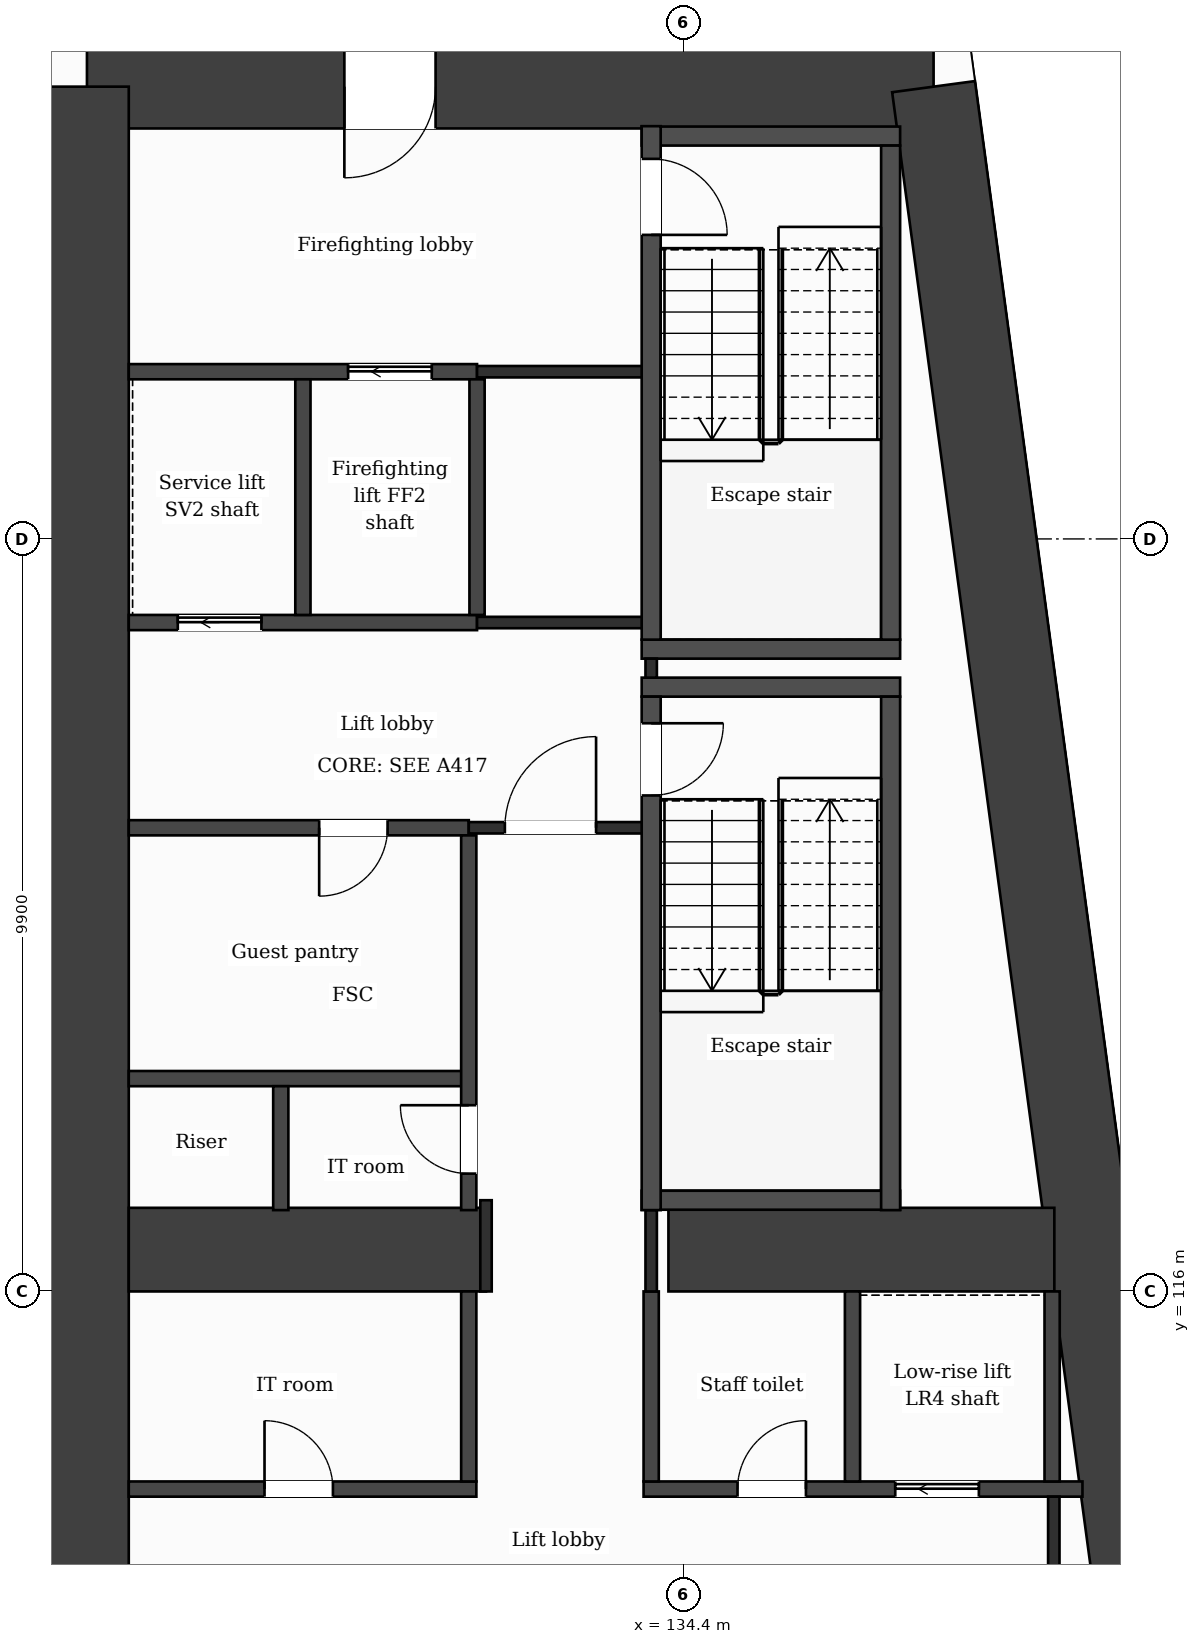
"""IFC4 building model, lengths in metres.
Left out: names, types, materials, properties, quantities, classifications, styles, units other than length and angle.
Written with IfcOpenShell. Run it as: python <this file> out.ifc"""

import sys

from ifc_helpers import new_model, si_unit, direction, frame, frame_2d, origin, place, context, subcontext, project, spatial, rectangle, extrude, element, fill, save


model = new_model("IFC4")
c1 = context("Model", 3, precision=1e-05, world=origin(), true_north=direction((0.0, 1.0)))
c2 = subcontext(c1, "Body", "Model", "MODEL_VIEW")
j1 = project(units=[si_unit("LENGTHUNIT", "METRE"), si_unit("PLANEANGLEUNIT", "RADIAN")], contexts=[c1])
p1 = place(None, origin())
s1 = spatial("IfcSite", under=j1, at=p1, CompositionType="ELEMENT")
p2 = place(p1, origin())
s2 = spatial("IfcBuilding", under=s1, at=p2, CompositionType="ELEMENT")
p3 = place(p2, frame((0.0, 0.0, 74.0)))
s3 = spatial("IfcBuildingStorey", under=s2, at=p3, CompositionType="ELEMENT", Elevation=74.0)
p4 = place(p3, frame((126.55, 131.85, 0.0), z_axis=(0.0, 0.0, 1.0), x_axis=(1.0, 0.0, 0.0)))
e1 = element("IfcWall", 1, at=p4, inside=s3, PredefinedType="SHEAR", context=c2, shape_type="SweptSolid", body=[
    extrude(rectangle(XDim=11.138, YDim=1.1, at=frame_2d((5.569, 0.0))), origin(), (0.0, 0.0, 1.0), 3.5),
])
p5 = place(p4, frame((3.386, 0.0, 0.0)))
e2 = element("IfcOpeningElement", 2, at=p5, cuts=e1, PredefinedType="OPENING", context=c2, shape_type="SweptSolid", body=[
    extrude(rectangle(XDim=1.2, YDim=2.1, at=frame_2d((0.6, 1.05))), frame((0.0, 0.56, 0.0), z_axis=(0.0, -1.0, 0.0), x_axis=(1.0, 0.0, 0.0)), (0.0, 0.0, 1.0), 1.12),
])
p6 = place(p3, frame((137.688, 131.85, 0.0), z_axis=(0.0, 0.0, 1.0), x_axis=(0.133411793472, -0.991060691059, 0.0)))
e3 = element("IfcWall", 3, at=p6, inside=s3, PredefinedType="SHEAR", context=c2, shape_type="SweptSolid", body=[
    extrude(rectangle(XDim=21.089, YDim=1.1, at=frame_2d((10.544, 0.0))), origin(), (0.0, 0.0, 1.0), 3.5),
])
p7 = place(p3, frame((126.55, 110.95, 0.0), z_axis=(0.0, 0.0, 1.0), x_axis=(0.0, 1.0, 0.0)))
e4 = element("IfcWall", 4, at=p7, inside=s3, PredefinedType="SHEAR", context=c2, shape_type="SweptSolid", body=[
    extrude(rectangle(XDim=20.9, YDim=1.1, at=frame_2d((10.45, 0.0))), origin(), (0.0, 0.0, 1.0), 3.5),
])
p8 = place(p3, frame((127.1, 116.55, 0.0), z_axis=(0.0, 0.0, 1.0), x_axis=(1.0, 0.0, 0.0)))
e5 = element("IfcWall", 5, at=p8, inside=s3, PredefinedType="SHEAR", context=c2, shape_type="SweptSolid", body=[
    extrude(rectangle(XDim=4.7, YDim=1.1, at=frame_2d((2.35, 0.0))), origin(), (0.0, 0.0, 1.0), 3.5),
])
p9 = place(p3, frame((134.2, 116.55, 0.0), z_axis=(0.0, 0.0, 1.0), x_axis=(1.0, 0.0, 0.0)))
e6 = element("IfcWall", 6, at=p9, inside=s3, PredefinedType="SHEAR", context=c2, shape_type="SweptSolid", body=[
    extrude(rectangle(XDim=5.077, YDim=1.1, at=frame_2d((2.539, 0.0))), origin(), (0.0, 0.0, 1.0), 3.5),
])
p10 = place(p3, frame((127.1, 113.4, 0.0), z_axis=(0.0, 0.0, 1.0), x_axis=(1.0, 0.0, 0.0)))
e7 = element("IfcWall", 7, at=p10, inside=s3, PredefinedType="PARTITIONING", context=c2, shape_type="SweptSolid", body=[
    extrude(rectangle(XDim=4.573, YDim=0.2, at=frame_2d((2.287, 0.0))), origin(), (0.0, 0.0, 1.0), 3.18),
])
p11 = place(p10, frame((1.786, 0.0, 0.0)))
e8 = element("IfcOpeningElement", 8, at=p11, cuts=e7, PredefinedType="OPENING", context=c2, shape_type="SweptSolid", body=[
    extrude(rectangle(XDim=0.9, YDim=2.1, at=frame_2d((0.45, 1.05))), frame((0.0, 0.11, 0.0), z_axis=(0.0, -1.0, 0.0), x_axis=(1.0, 0.0, 0.0)), (0.0, 0.0, 1.0), 0.22),
])
p12 = place(p3, frame((133.873, 113.4, 0.0), z_axis=(0.0, 0.0, 1.0), x_axis=(1.0, 0.0, 0.0)))
e9 = element("IfcWall", 9, at=p12, inside=s3, PredefinedType="PARTITIONING", context=c2, shape_type="SweptSolid", body=[
    extrude(rectangle(XDim=5.774, YDim=0.2, at=frame_2d((2.887, 0.0))), origin(), (0.0, 0.0, 1.0), 3.18),
])
p13 = place(p12, frame((3.311, 0.0, 0.0)))
e10 = element("IfcOpeningElement", 10, at=p13, cuts=e9, PredefinedType="OPENING", context=c2, shape_type="SweptSolid", body=[
    extrude(rectangle(XDim=1.1, YDim=2.1, at=frame_2d((0.55, 1.05))), frame((0.0, 0.11, 0.0), z_axis=(0.0, -1.0, 0.0), x_axis=(1.0, 0.0, 0.0)), (0.0, 0.0, 1.0), 0.22),
])
p14 = place(p12, frame((1.236, 0.0, 0.0)))
e11 = element("IfcOpeningElement", 11, at=p14, cuts=e9, PredefinedType="OPENING", context=c2, shape_type="SweptSolid", body=[
    extrude(rectangle(XDim=0.9, YDim=2.1, at=frame_2d((0.45, 1.05))), frame((0.0, 0.11, 0.0), z_axis=(0.0, -1.0, 0.0), x_axis=(1.0, 0.0, 0.0)), (0.0, 0.0, 1.0), 0.22),
])
p15 = place(p3, frame((133.848, 117.2, 0.0), z_axis=(0.0, 0.0, 1.0), x_axis=(1.0, 0.0, 0.0)))
e12 = element("IfcWall", 12, at=p15, inside=s3, PredefinedType="PARTITIONING", context=c2, shape_type="SweptSolid", body=[
    extrude(rectangle(XDim=3.4, YDim=0.25, at=frame_2d((1.7, 0.0))), origin(), (0.0, 0.0, 1.0), 3.18),
])
p16 = place(p3, frame((127.1, 118.8, 0.0), z_axis=(0.0, 0.0, 1.0), x_axis=(1.0, 0.0, 0.0)))
e13 = element("IfcWall", 13, at=p16, inside=s3, PredefinedType="PARTITIONING", context=c2, shape_type="SweptSolid", body=[
    extrude(rectangle(XDim=4.473, YDim=0.2, at=frame_2d((2.236, 0.0))), origin(), (0.0, 0.0, 1.0), 3.18),
])
p17 = place(p3, frame((127.1, 122.1, 0.0), z_axis=(0.0, 0.0, 1.0), x_axis=(1.0, 0.0, 0.0)))
e14 = element("IfcWall", 14, at=p17, inside=s3, PredefinedType="PARTITIONING", context=c2, shape_type="SweptSolid", body=[
    extrude(rectangle(XDim=4.473, YDim=0.2, at=frame_2d((2.236, 0.0))), origin(), (0.0, 0.0, 1.0), 3.18),
])
p18 = place(p17, frame((2.505, 0.0, 0.0)))
e15 = element("IfcOpeningElement", 15, at=p18, cuts=e14, PredefinedType="OPENING", context=c2, shape_type="SweptSolid", body=[
    extrude(rectangle(XDim=0.9, YDim=2.1, at=frame_2d((0.45, 1.05))), frame((0.0, 0.11, 0.0), z_axis=(0.0, -1.0, 0.0), x_axis=(1.0, 0.0, 0.0)), (0.0, 0.0, 1.0), 0.22),
])
p19 = place(p3, frame((131.573, 122.1, 0.0), z_axis=(0.0, 0.0, 1.0), x_axis=(1.0, 0.0, 0.0)))
e16 = element("IfcWall", 16, at=p19, inside=s3, PredefinedType="PARTITIONING", context=c2, shape_type="SweptSolid", body=[
    extrude(rectangle(XDim=2.4, YDim=0.15, at=frame_2d((1.2, 0.0))), origin(), (0.0, 0.0, 1.0), 3.18),
])
p20 = place(p19, frame((0.475, 0.0, 0.0)))
e17 = element("IfcOpeningElement", 17, at=p20, cuts=e16, PredefinedType="OPENING", context=c2, shape_type="SweptSolid", body=[
    extrude(rectangle(XDim=1.2, YDim=2.1, at=frame_2d((0.6, 1.05))), frame((0.0, 0.085, 0.0), z_axis=(0.0, -1.0, 0.0), x_axis=(1.0, 0.0, 0.0)), (0.0, 0.0, 1.0), 0.17),
])
for number, where, z_axis, x_axis in (
    (18, (133.848, 123.95, 0.0), (0.0, 0.0, 1.0), (1.0, 0.0, 0.0)),
    (19, (133.848, 124.45, 0.0), (0.0, 0.0, 1.0), (1.0, 0.0, 0.0)),
):
    element("IfcWall", number, at=place(p3, frame(where, z_axis=z_axis, x_axis=x_axis)), inside=s3, PredefinedType="PARTITIONING", context=c2, shape_type="SweptSolid", body=[
        extrude(rectangle(XDim=3.4, YDim=0.25, at=frame_2d((1.7, 0.0))), origin(), (0.0, 0.0, 1.0), 3.18),
    ])
p21 = place(p3, frame((127.1, 124.8, 0.0), z_axis=(0.0, 0.0, 1.0), x_axis=(1.0, 0.0, 0.0)))
e20 = element("IfcWall", 20, at=p21, inside=s3, PredefinedType="PARTITIONING", context=c2, shape_type="SweptSolid", body=[
    extrude(rectangle(XDim=4.582, YDim=0.2, at=frame_2d((2.291, 0.0))), origin(), (0.0, 0.0, 1.0), 3.18),
])
p22 = place(p21, frame((0.645, 0.0, 0.0)))
e21 = element("IfcOpeningElement", 21, at=p22, cuts=e20, PredefinedType="OPENING", context=c2, shape_type="SweptSolid", body=[
    extrude(rectangle(XDim=1.1, YDim=2.1, at=frame_2d((0.55, 1.05))), frame((0.0, 0.11, 0.0), z_axis=(0.0, -1.0, 0.0), x_axis=(1.0, 0.0, 0.0)), (0.0, 0.0, 1.0), 0.22),
])
p23 = place(p3, frame((131.682, 124.8, 0.0), z_axis=(0.0, 0.0, 1.0), x_axis=(1.0, 0.0, 0.0)))
e22 = element("IfcWall", 22, at=p23, inside=s3, PredefinedType="PARTITIONING", context=c2, shape_type="SweptSolid", body=[
    extrude(rectangle(XDim=2.416, YDim=0.15, at=frame_2d((1.208, 0.0))), origin(), (0.0, 0.0, 1.0), 3.18),
])
p24 = place(p3, frame((127.1, 128.1, 0.0), z_axis=(0.0, 0.0, 1.0), x_axis=(1.0, 0.0, 0.0)))
e23 = element("IfcWall", 23, at=p24, inside=s3, PredefinedType="PARTITIONING", context=c2, shape_type="SweptSolid", body=[
    extrude(rectangle(XDim=4.582, YDim=0.2, at=frame_2d((2.291, 0.0))), origin(), (0.0, 0.0, 1.0), 3.18),
])
p25 = place(p24, frame((2.886, 0.0, 0.0)))
e24 = element("IfcOpeningElement", 24, at=p25, cuts=e23, PredefinedType="OPENING", context=c2, shape_type="SweptSolid", body=[
    extrude(rectangle(XDim=1.1, YDim=2.1, at=frame_2d((0.55, 1.05))), frame((0.0, 0.11, 0.0), z_axis=(0.0, -1.0, 0.0), x_axis=(1.0, 0.0, 0.0)), (0.0, 0.0, 1.0), 0.22),
])
p26 = place(p3, frame((131.682, 128.1, 0.0), z_axis=(0.0, 0.0, 1.0), x_axis=(1.0, 0.0, 0.0)))
e25 = element("IfcWall", 25, at=p26, inside=s3, PredefinedType="PARTITIONING", context=c2, shape_type="SweptSolid", body=[
    extrude(rectangle(XDim=2.291, YDim=0.15, at=frame_2d((1.146, 0.0))), origin(), (0.0, 0.0, 1.0), 3.18),
])
p27 = place(p3, frame((133.848, 131.2, 0.0), z_axis=(0.0, 0.0, 1.0), x_axis=(1.0, 0.0, 0.0)))
e26 = element("IfcWall", 26, at=p27, inside=s3, PredefinedType="PARTITIONING", context=c2, shape_type="SweptSolid", body=[
    extrude(rectangle(XDim=3.4, YDim=0.25, at=frame_2d((1.7, 0.0))), origin(), (0.0, 0.0, 1.0), 3.18),
])
p28 = place(p3, frame((129.1, 117.07, 0.0), z_axis=(0.0, 0.0, 1.0), x_axis=(0.0, 1.0, 0.0)))
e27 = element("IfcWall", 27, at=p28, inside=s3, PredefinedType="PARTITIONING", context=c2, shape_type="SweptSolid", body=[
    extrude(rectangle(XDim=1.63, YDim=0.2, at=frame_2d((0.815, 0.0))), origin(), (0.0, 0.0, 1.0), 3.18),
])
p29 = place(p3, frame((129.391, 124.9, 0.0), z_axis=(0.0, 0.0, 1.0), x_axis=(0.0, 1.0, 0.0)))
e28 = element("IfcWall", 28, at=p29, inside=s3, PredefinedType="PARTITIONING", context=c2, shape_type="SweptSolid", body=[
    extrude(rectangle(XDim=3.1, YDim=0.2, at=frame_2d((1.55, 0.0))), origin(), (0.0, 0.0, 1.0), 3.18),
])
p30 = place(p3, frame((131.573, 113.5, 0.0), z_axis=(0.0, 0.0, 1.0), x_axis=(0.0, 1.0, 0.0)))
e29 = element("IfcWall", 29, at=p30, inside=s3, PredefinedType="PARTITIONING", context=c2, shape_type="SweptSolid", body=[
    extrude(rectangle(XDim=2.5, YDim=0.2, at=frame_2d((1.25, 0.0))), origin(), (0.0, 0.0, 1.0), 3.18),
])
p31 = place(p3, frame((131.573, 117.07, 0.0), z_axis=(0.0, 0.0, 1.0), x_axis=(0.0, 1.0, 0.0)))
e30 = element("IfcWall", 30, at=p31, inside=s3, PredefinedType="PARTITIONING", context=c2, shape_type="SweptSolid", body=[
    extrude(rectangle(XDim=4.93, YDim=0.2, at=frame_2d((2.465, 0.0))), origin(), (0.0, 0.0, 1.0), 3.18),
])
p32 = place(p31, frame((0.48, 0.0, 0.0)))
e31 = element("IfcOpeningElement", 31, at=p32, cuts=e30, PredefinedType="OPENING", context=c2, shape_type="SweptSolid", body=[
    extrude(rectangle(XDim=0.9, YDim=2.1, at=frame_2d((0.45, 1.05))), frame((0.0, 0.11, 0.0), z_axis=(0.0, -1.0, 0.0), x_axis=(1.0, 0.0, 0.0)), (0.0, 0.0, 1.0), 0.22),
])
p33 = place(p3, frame((131.682, 124.9, 0.0), z_axis=(0.0, 0.0, 1.0), x_axis=(0.0, 1.0, 0.0)))
e32 = element("IfcWall", 32, at=p33, inside=s3, PredefinedType="PARTITIONING", context=c2, shape_type="SweptSolid", body=[
    extrude(rectangle(XDim=3.1, YDim=0.2, at=frame_2d((1.55, 0.0))), origin(), (0.0, 0.0, 1.0), 3.18),
])
p34 = place(p3, frame((131.8, 116.0, 0.0), z_axis=(0.0, 0.0, 1.0), x_axis=(0.0, 1.0, 0.0)))
e33 = element("IfcWall", 33, at=p34, inside=s3, PredefinedType="PARTITIONING", context=c2, shape_type="SweptSolid", body=[
    extrude(rectangle(XDim=1.2, YDim=0.15, at=frame_2d((0.6, 0.0))), origin(), (0.0, 0.0, 1.0), 3.18),
])
p35 = place(p3, frame((133.973, 113.5, 0.0), z_axis=(0.0, 0.0, 1.0), x_axis=(0.0, 1.0, 0.0)))
e34 = element("IfcWall", 34, at=p35, inside=s3, PredefinedType="PARTITIONING", context=c2, shape_type="SweptSolid", body=[
    extrude(rectangle(XDim=2.5, YDim=0.2, at=frame_2d((1.25, 0.0))), origin(), (0.0, 0.0, 1.0), 3.18),
])
p36 = place(p3, frame((133.973, 116.0, 0.0), z_axis=(0.0, 0.0, 1.0), x_axis=(0.0, 1.0, 0.0)))
e35 = element("IfcWall", 35, at=p36, inside=s3, PredefinedType="PARTITIONING", context=c2, shape_type="SweptSolid", body=[
    extrude(rectangle(XDim=1.07, YDim=0.15, at=frame_2d((0.535, 0.0))), origin(), (0.0, 0.0, 1.0), 3.18),
])
p37 = place(p3, frame((133.973, 124.075, 0.0), z_axis=(0.0, 0.0, 1.0), x_axis=(0.0, 1.0, 0.0)))
e36 = element("IfcWall", 36, at=p37, inside=s3, PredefinedType="PARTITIONING", context=c2, shape_type="SweptSolid", body=[
    extrude(rectangle(XDim=0.25, YDim=0.15, at=frame_2d((0.125, 0.0))), origin(), (0.0, 0.0, 1.0), 3.18),
])
p38 = place(p3, frame((133.973, 117.07, 0.0), z_axis=(0.0, 0.0, 1.0), x_axis=(0.0, 1.0, 0.0)))
e37 = element("IfcWall", 37, at=p38, inside=s3, PredefinedType="PARTITIONING", context=c2, shape_type="SweptSolid", body=[
    extrude(rectangle(XDim=6.755, YDim=0.25, at=frame_2d((3.377, 0.0))), origin(), (0.0, 0.0, 1.0), 3.18),
])
p39 = place(p38, frame((5.455, 0.0, 0.0)))
e38 = element("IfcOpeningElement", 38, at=p39, cuts=e37, PredefinedType="OPENING", context=c2, shape_type="SweptSolid", body=[
    extrude(rectangle(XDim=0.95, YDim=2.1, at=frame_2d((0.475, 1.05))), frame((0.0, 0.135, 0.0), z_axis=(0.0, -1.0, 0.0), x_axis=(1.0, 0.0, 0.0)), (0.0, 0.0, 1.0), 0.27),
])
p40 = place(p3, frame((133.973, 124.575, 0.0), z_axis=(0.0, 0.0, 1.0), x_axis=(0.0, 1.0, 0.0)))
e39 = element("IfcWall", 39, at=p40, inside=s3, PredefinedType="PARTITIONING", context=c2, shape_type="SweptSolid", body=[
    extrude(rectangle(XDim=6.755, YDim=0.25, at=frame_2d((3.377, 0.0))), origin(), (0.0, 0.0, 1.0), 3.18),
])
p41 = place(p40, frame((5.325, 0.0, 0.0)))
e40 = element("IfcOpeningElement", 40, at=p41, cuts=e39, PredefinedType="OPENING", context=c2, shape_type="SweptSolid", body=[
    extrude(rectangle(XDim=1.0, YDim=2.1, at=frame_2d((0.5, 1.05))), frame((0.0, 0.135, 0.0), z_axis=(0.0, -1.0, 0.0), x_axis=(1.0, 0.0, 0.0)), (0.0, 0.0, 1.0), 0.27),
])
p42 = place(p3, frame((136.622, 113.5, 0.0), z_axis=(0.0, 0.0, 1.0), x_axis=(0.0, 1.0, 0.0)))
e41 = element("IfcWall", 41, at=p42, inside=s3, PredefinedType="PARTITIONING", context=c2, shape_type="SweptSolid", body=[
    extrude(rectangle(XDim=2.5, YDim=0.2, at=frame_2d((1.25, 0.0))), origin(), (0.0, 0.0, 1.0), 3.18),
])
p43 = place(p3, frame((137.123, 117.07, 0.0), z_axis=(0.0, 0.0, 1.0), x_axis=(0.0, 1.0, 0.0)))
e42 = element("IfcWall", 42, at=p43, inside=s3, PredefinedType="PARTITIONING", context=c2, shape_type="SweptSolid", body=[
    extrude(rectangle(XDim=6.755, YDim=0.25, at=frame_2d((3.377, 0.0))), origin(), (0.0, 0.0, 1.0), 3.18),
])
p44 = place(p3, frame((137.123, 124.575, 0.0), z_axis=(0.0, 0.0, 1.0), x_axis=(0.0, 1.0, 0.0)))
e43 = element("IfcWall", 43, at=p44, inside=s3, PredefinedType="PARTITIONING", context=c2, shape_type="SweptSolid", body=[
    extrude(rectangle(XDim=6.5, YDim=0.25, at=frame_2d((3.25, 0.0))), origin(), (0.0, 0.0, 1.0), 3.18),
])
p45 = place(p3, frame((139.248, 113.5, 0.0), z_axis=(0.0, 0.0, 1.0), x_axis=(0.0, 1.0, 0.0)))
e44 = element("IfcWall", 44, at=p45, inside=s3, PredefinedType="PARTITIONING", context=c2, shape_type="SweptSolid", body=[
    extrude(rectangle(XDim=2.5, YDim=0.2, at=frame_2d((1.25, 0.0))), origin(), (0.0, 0.0, 1.0), 3.18),
])
p46 = place(p3, frame((139.27, 111.5, 0.0), z_axis=(0.0, 0.0, 1.0), x_axis=(0.0, 1.0, 0.0)))
e45 = element("IfcWall", 45, at=p46, inside=s3, PredefinedType="PARTITIONING", context=c2, shape_type="SweptSolid", body=[
    extrude(rectangle(XDim=1.8, YDim=0.15, at=frame_2d((0.9, 0.0))), origin(), (0.0, 0.0, 1.0), 3.18),
])
p47 = place(p20, origin())
e46 = element("IfcDoor", 46, at=p47, inside=s3, OperationType="SINGLE_SWING_RIGHT", PredefinedType="DOOR", context=c2, shape_type="SweptSolid", body=[
    extrude(rectangle(XDim=1.2, YDim=2.1, at=frame_2d((0.6, 1.05))), frame((0.0, 0.025, 0.0), z_axis=(0.0, -1.0, 0.0), x_axis=(1.0, 0.0, 0.0)), (0.0, 0.0, 1.0), 0.05),
])
fill(e17, e46)
p48 = place(p25, origin())
e47 = element("IfcDoor", 47, at=p48, inside=s3, OperationType="SLIDING_TO_LEFT", PredefinedType="DOOR", context=c2, shape_type="SweptSolid", body=[
    extrude(rectangle(XDim=1.1, YDim=2.1, at=frame_2d((0.55, 1.05))), frame((0.0, 0.025, 0.0), z_axis=(0.0, -1.0, 0.0), x_axis=(1.0, 0.0, 0.0)), (0.0, 0.0, 1.0), 0.05),
])
fill(e24, e47)
p49 = place(p22, origin())
e48 = element("IfcDoor", 48, at=p49, inside=s3, OperationType="SLIDING_TO_LEFT", PredefinedType="DOOR", context=c2, shape_type="SweptSolid", body=[
    extrude(rectangle(XDim=1.1, YDim=2.1, at=frame_2d((0.55, 1.05))), frame((0.0, 0.025, 0.0), z_axis=(0.0, -1.0, 0.0), x_axis=(1.0, 0.0, 0.0)), (0.0, 0.0, 1.0), 0.05),
])
fill(e21, e48)
p50 = place(p18, origin())
e49 = element("IfcDoor", 49, at=p50, inside=s3, OperationType="SINGLE_SWING_LEFT", PredefinedType="DOOR", context=c2, shape_type="SweptSolid", body=[
    extrude(rectangle(XDim=0.9, YDim=2.1, at=frame_2d((0.45, 1.05))), frame((0.0, 0.025, 0.0), z_axis=(0.0, -1.0, 0.0), x_axis=(1.0, 0.0, 0.0)), (0.0, 0.0, 1.0), 0.05),
])
fill(e15, e49)
p51 = place(p39, origin())
e50 = element("IfcDoor", 50, at=p51, inside=s3, OperationType="SINGLE_SWING_RIGHT", PredefinedType="DOOR", context=c2, shape_type="SweptSolid", body=[
    extrude(rectangle(XDim=0.95, YDim=2.1, at=frame_2d((0.475, 1.05))), frame((0.0, 0.025, 0.0), z_axis=(0.0, -1.0, 0.0), x_axis=(1.0, 0.0, 0.0)), (0.0, 0.0, 1.0), 0.05),
])
fill(e38, e50)
p52 = place(p41, origin())
e51 = element("IfcDoor", 51, at=p52, inside=s3, OperationType="SINGLE_SWING_LEFT", PredefinedType="DOOR", context=c2, shape_type="SweptSolid", body=[
    extrude(rectangle(XDim=1.0, YDim=2.1, at=frame_2d((0.5, 1.05))), frame((0.0, 0.025, 0.0), z_axis=(0.0, -1.0, 0.0), x_axis=(1.0, 0.0, 0.0)), (0.0, 0.0, 1.0), 0.05),
])
fill(e40, e51)
p53 = place(p32, origin())
e52 = element("IfcDoor", 52, at=p53, inside=s3, OperationType="SINGLE_SWING_RIGHT", PredefinedType="DOOR", context=c2, shape_type="SweptSolid", body=[
    extrude(rectangle(XDim=0.9, YDim=2.1, at=frame_2d((0.45, 1.05))), frame((0.0, 0.025, 0.0), z_axis=(0.0, -1.0, 0.0), x_axis=(1.0, 0.0, 0.0)), (0.0, 0.0, 1.0), 0.05),
])
fill(e31, e52)
p54 = place(p13, origin())
e53 = element("IfcDoor", 53, at=p54, inside=s3, OperationType="SLIDING_TO_LEFT", PredefinedType="DOOR", context=c2, shape_type="SweptSolid", body=[
    extrude(rectangle(XDim=1.1, YDim=2.1, at=frame_2d((0.55, 1.05))), frame((0.0, 0.025, 0.0), z_axis=(0.0, -1.0, 0.0), x_axis=(1.0, 0.0, 0.0)), (0.0, 0.0, 1.0), 0.05),
])
fill(e10, e53)
p55 = place(p14, origin())
e54 = element("IfcDoor", 54, at=p55, inside=s3, OperationType="SINGLE_SWING_RIGHT", PredefinedType="DOOR", context=c2, shape_type="SweptSolid", body=[
    extrude(rectangle(XDim=0.9, YDim=2.1, at=frame_2d((0.45, 1.05))), frame((0.0, 0.025, 0.0), z_axis=(0.0, -1.0, 0.0), x_axis=(1.0, 0.0, 0.0)), (0.0, 0.0, 1.0), 0.05),
])
fill(e11, e54)
p56 = place(p11, origin())
e55 = element("IfcDoor", 55, at=p56, inside=s3, OperationType="SINGLE_SWING_LEFT", PredefinedType="DOOR", context=c2, shape_type="SweptSolid", body=[
    extrude(rectangle(XDim=0.9, YDim=2.1, at=frame_2d((0.45, 1.05))), frame((0.0, 0.025, 0.0), z_axis=(0.0, -1.0, 0.0), x_axis=(1.0, 0.0, 0.0)), (0.0, 0.0, 1.0), 0.05),
])
fill(e8, e55)
p57 = place(p5, origin())
e56 = element("IfcDoor", 56, at=p57, inside=s3, OperationType="SINGLE_SWING_LEFT", PredefinedType="DOOR", context=c2, shape_type="SweptSolid", body=[
    extrude(rectangle(XDim=1.2, YDim=2.1, at=frame_2d((0.6, 1.05))), frame((0.0, 0.025, 0.0), z_axis=(0.0, -1.0, 0.0), x_axis=(1.0, 0.0, 0.0)), (0.0, 0.0, 1.0), 0.05),
])
fill(e2, e56)
save(model, sys.argv[1])
